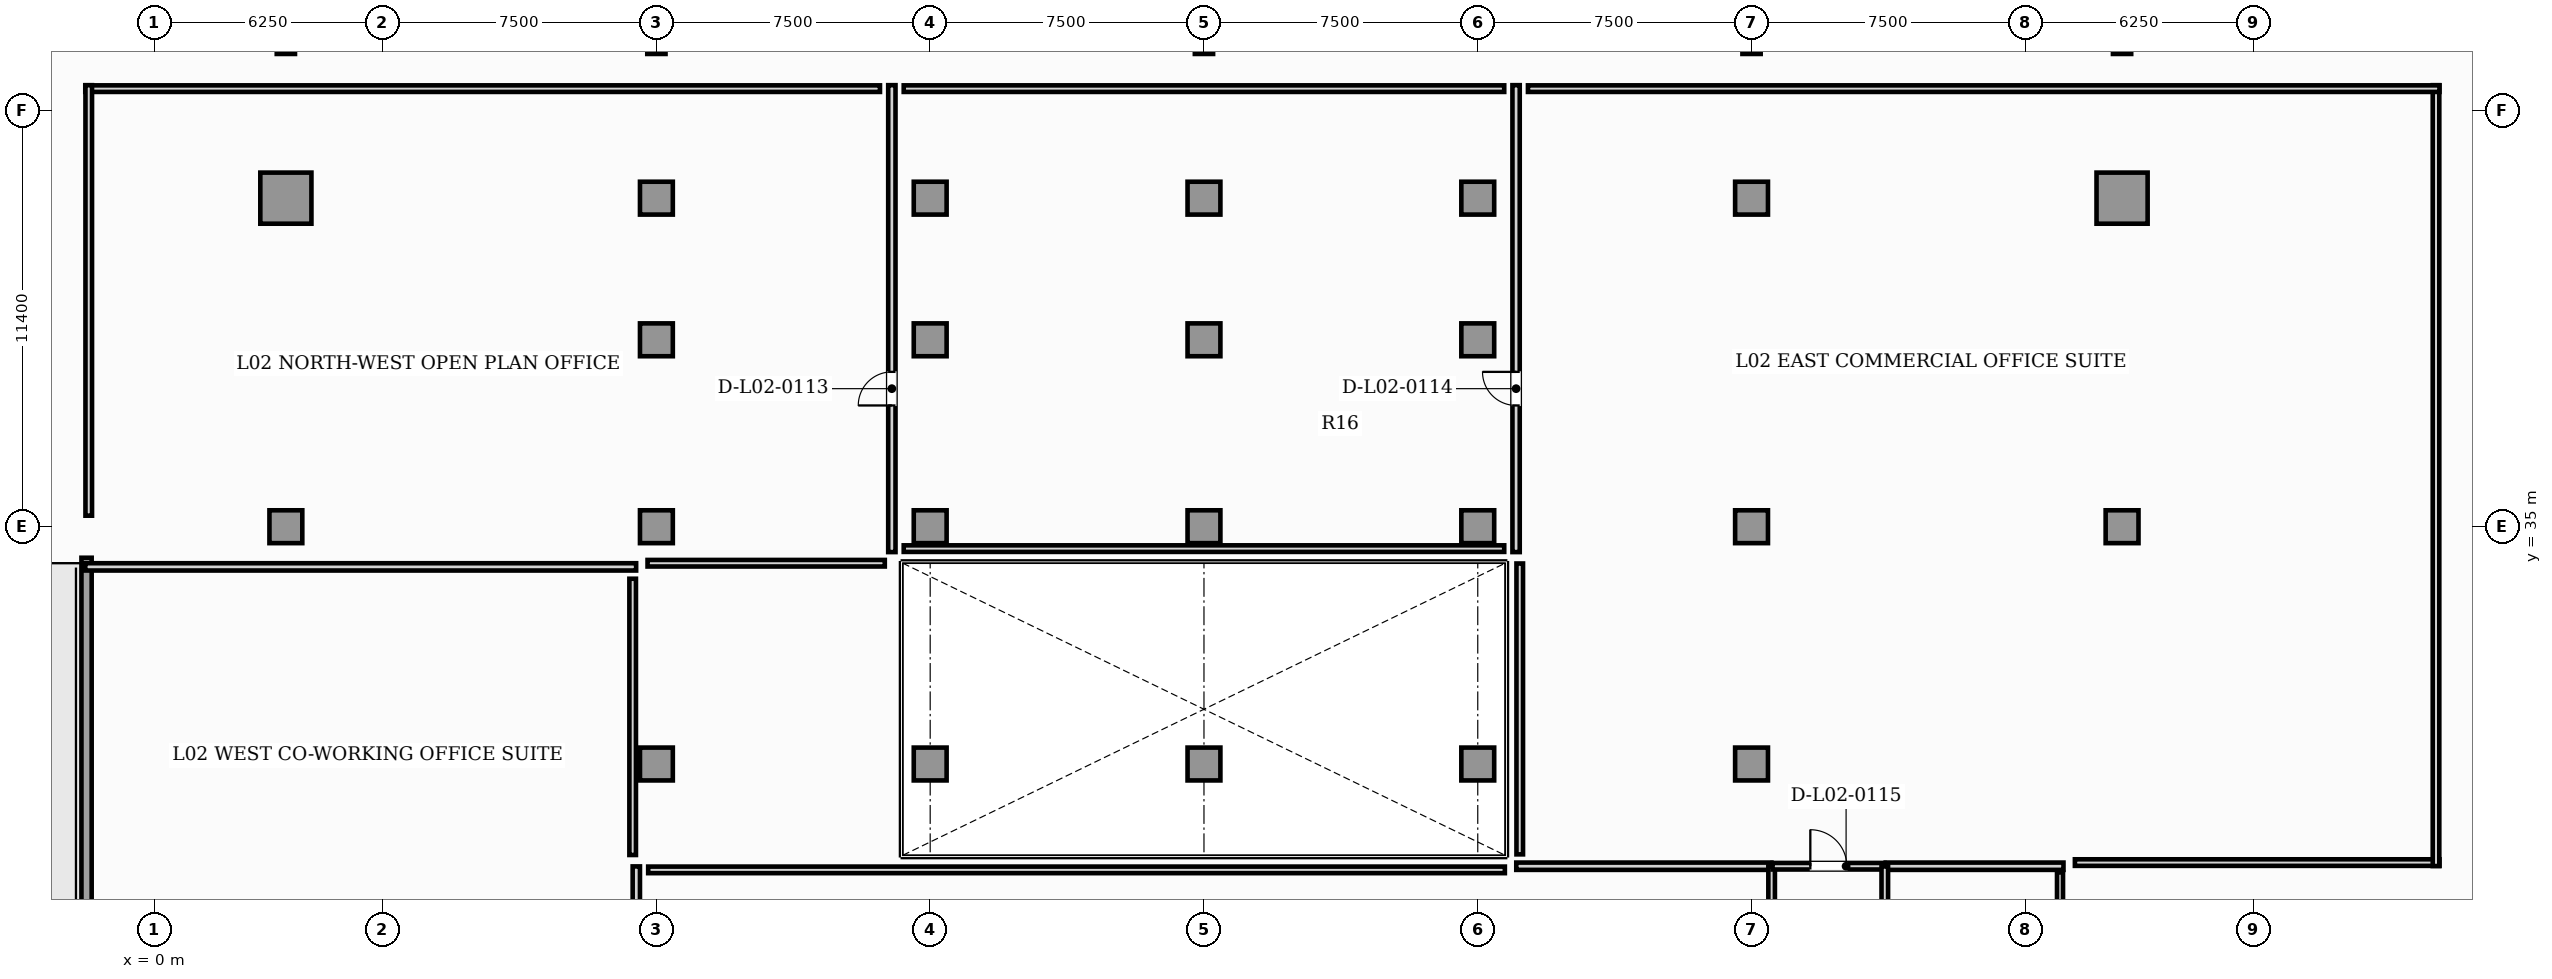
"""IFC4 building model, lengths in metres.
Left out: names, types, materials, properties, quantities, classifications, styles, units other than length and angle.
Written with IfcOpenShell. Run it as: python <this file> out.ifc"""

import sys

from ifc_helpers import new_model, si_unit, direction, frame, frame_2d, origin, origin_2d, place, context, subcontext, project, spatial, rectangle, hollow_rectangle, extrude, element, fill, save


model = new_model("IFC4")
c1 = context("Model", 3, precision=1e-05, world=origin(), true_north=direction((0.0, 1.0)))
c2 = subcontext(c1, "Body", "Model", "MODEL_VIEW")
j1 = project(units=[si_unit("LENGTHUNIT", "METRE"), si_unit("PLANEANGLEUNIT", "RADIAN")], contexts=[c1])
p1 = place(None, origin())
s1 = spatial("IfcSite", under=j1, at=p1, CompositionType="ELEMENT")
p2 = place(p1, origin())
s2 = spatial("IfcBuilding", under=s1, at=p2, CompositionType="ELEMENT")
p3 = place(p2, frame((0.0, 0.0, 10.2)))
s3 = spatial("IfcBuildingStorey", under=s2, at=p3, CompositionType="ELEMENT", Elevation=10.2)
p4 = place(p3, frame((-1.86, 3.88, 0.0), z_axis=(0.0, 0.0, 1.0), x_axis=(0.0, 1.0, 0.0)))
e1 = element("IfcWall", 1, at=p4, inside=s3, PredefinedType="SHEAR", context=c2, shape_type="SweptSolid", body=[
    extrude(rectangle(XDim=30.27, YDim=0.28, at=frame_2d((15.135, 0.0))), origin(), (0.0, 0.0, 1.0), 4.52),
])
for number, where, z_axis, x_axis in (
    (2, (53.9, 44.0, 0.0), (0.0, 0.0, 1.0), (1.0, 0.0, 0.0)),
    (3, (3.6, 44.0, 0.0), (0.0, 0.0, 1.0), (1.0, 0.0, 0.0)),
):
    element("IfcColumn", number, at=place(p3, frame(where, z_axis=z_axis, x_axis=x_axis)), inside=s3, PredefinedType="USERDEFINED", context=c2, shape_type="SweptSolid", body=[
        extrude(hollow_rectangle(XDim=1.4, YDim=1.4, WallThickness=0.08, at=origin_2d()), origin(), (0.0, 0.0, 1.0), 4.8),
    ])
for number, where, z_axis, x_axis in (
    (4, (3.6, 35.0, 0.0), (0.0, 0.0, 1.0), (1.0, 0.0, 0.0)),
    (5, (13.75, 35.0, 0.0), (0.0, 0.0, 1.0), (1.0, 0.0, 0.0)),
    (6, (13.75, 44.0, 0.0), (0.0, 0.0, 1.0), (1.0, 0.0, 0.0)),
    (7, (28.75, 35.0, 0.0), (0.0, 0.0, 1.0), (1.0, 0.0, 0.0)),
    (8, (28.75, 44.0, 0.0), (0.0, 0.0, 1.0), (1.0, 0.0, 0.0)),
    (9, (43.75, 35.0, 0.0), (0.0, 0.0, 1.0), (1.0, 0.0, 0.0)),
    (10, (43.75, 44.0, 0.0), (0.0, 0.0, 1.0), (1.0, 0.0, 0.0)),
    (11, (53.9, 35.0, 0.0), (0.0, 0.0, 1.0), (1.0, 0.0, 0.0)),
    (12, (13.75, 28.5, 0.0), (0.0, 0.0, 1.0), (1.0, 0.0, 0.0)),
    (13, (21.25, 28.5, 0.0), (0.0, 0.0, 1.0), (1.0, 0.0, 0.0)),
    (14, (28.75, 28.5, 0.0), (0.0, 0.0, 1.0), (1.0, 0.0, 0.0)),
    (15, (36.25, 28.5, 0.0), (0.0, 0.0, 1.0), (1.0, 0.0, 0.0)),
    (16, (43.75, 28.5, 0.0), (0.0, 0.0, 1.0), (1.0, 0.0, 0.0)),
    (17, (21.25, 35.0, 0.0), (0.0, 0.0, 1.0), (1.0, 0.0, 0.0)),
    (18, (36.25, 35.0, 0.0), (0.0, 0.0, 1.0), (1.0, 0.0, 0.0)),
    (19, (13.75, 40.12, 0.0), (0.0, 0.0, 1.0), (1.0, 0.0, 0.0)),
    (20, (21.25, 40.12, 0.0), (0.0, 0.0, 1.0), (1.0, 0.0, 0.0)),
    (21, (28.75, 40.12, 0.0), (0.0, 0.0, 1.0), (1.0, 0.0, 0.0)),
    (22, (36.25, 40.12, 0.0), (0.0, 0.0, 1.0), (1.0, 0.0, 0.0)),
    (23, (21.25, 44.0, 0.0), (0.0, 0.0, 1.0), (1.0, 0.0, 0.0)),
    (24, (36.25, 44.0, 0.0), (0.0, 0.0, 1.0), (1.0, 0.0, 0.0)),
):
    element("IfcColumn", number, at=place(p3, frame(where, z_axis=z_axis, x_axis=x_axis)), inside=s3, PredefinedType="COLUMN", context=c2, shape_type="SweptSolid", body=[
        extrude(rectangle(XDim=0.9, YDim=0.9, at=origin_2d()), origin(), (0.0, 0.0, 1.0), 4.8),
    ])
for number, where, z_axis, x_axis in (
    (25, (3.6, 48.2, 0.0), (0.0, 0.0, 1.0), (1.0, 0.0, 0.0)),
    (26, (13.75, 48.2, 0.0), (0.0, 0.0, 1.0), (1.0, 0.0, 0.0)),
    (27, (28.75, 48.2, 0.0), (0.0, 0.0, 1.0), (1.0, 0.0, 0.0)),
    (28, (43.75, 48.2, 0.0), (0.0, 0.0, 1.0), (1.0, 0.0, 0.0)),
    (29, (53.9, 48.2, 0.0), (0.0, 0.0, 1.0), (1.0, 0.0, 0.0)),
):
    element("IfcColumn", number, at=place(p3, frame(where, z_axis=z_axis, x_axis=x_axis)), inside=s3, PredefinedType="COLUMN", context=c2, shape_type="SweptSolid", body=[
        extrude(hollow_rectangle(XDim=0.5, YDim=0.5, WallThickness=0.032, at=origin_2d()), origin(), (0.0, 0.0, 1.0), 4.8),
    ])
p5 = place(p3, frame((13.2, 14.155, 0.0), z_axis=(0.0, 0.0, 1.0), x_axis=(0.0, 1.0, 0.0)))
e30 = element("IfcWall", 30, at=p5, inside=s3, PredefinedType="PARTITIONING", context=c2, shape_type="SweptSolid", body=[
    extrude(rectangle(XDim=11.54, YDim=0.2, at=frame_2d((5.77, 0.0))), origin(), (0.0, 0.0, 1.0), 4.52),
])
p6 = place(p3, frame((37.305, 25.7, 0.0), z_axis=(0.0, 0.0, 1.0), x_axis=(1.0, 0.0, 0.0)))
e31 = element("IfcWall", 31, at=p6, inside=s3, PredefinedType="PARTITIONING", context=c2, shape_type="SweptSolid", body=[
    extrude(rectangle(XDim=6.99, YDim=0.2, at=frame_2d((3.495, 0.0))), origin(), (0.0, 0.0, 1.0), 4.52),
])
p7 = place(p3, frame((44.3, 14.155, 0.0), z_axis=(0.0, 0.0, 1.0), x_axis=(0.0, 1.0, 0.0)))
e32 = element("IfcWall", 32, at=p7, inside=s3, PredefinedType="PARTITIONING", context=c2, shape_type="SweptSolid", body=[
    extrude(rectangle(XDim=11.54, YDim=0.18, at=frame_2d((5.77, 0.0))), origin(), (0.0, 0.0, 1.0), 4.52),
])
p8 = place(p7, frame((5.27, 0.0, 0.0)))
e33 = element("IfcOpeningElement", 33, at=p8, cuts=e32, PredefinedType="OPENING", context=c2, shape_type="SweptSolid", body=[
    extrude(rectangle(XDim=1.0, YDim=2.15, at=frame_2d((0.5, 1.075))), frame((0.0, 0.1, 0.0), z_axis=(0.0, -1.0, 0.0), x_axis=(1.0, 0.0, 0.0)), (0.0, 0.0, 1.0), 0.2),
])
p9 = place(p3, frame((-1.895, 33.9, 0.0), z_axis=(0.0, 0.0, 1.0), x_axis=(1.0, 0.0, 0.0)))
e34 = element("IfcWall", 34, at=p9, inside=s3, PredefinedType="PARTITIONING", context=c2, shape_type="SweptSolid", body=[
    extrude(rectangle(XDim=15.09, YDim=0.2, at=frame_2d((7.545, 0.0))), origin(), (0.0, 0.0, 1.0), 4.52),
])
p10 = place(p3, frame((20.2, 34.305, 0.0), z_axis=(0.0, 0.0, 1.0), x_axis=(0.0, 1.0, 0.0)))
e35 = element("IfcWall", 35, at=p10, inside=s3, PredefinedType="PARTITIONING", context=c2, shape_type="SweptSolid", body=[
    extrude(rectangle(XDim=12.79, YDim=0.2, at=frame_2d((6.395, 0.0))), origin(), (0.0, 0.0, 1.0), 4.52),
])
p11 = place(p10, frame((4.017, 0.0, 0.0)))
e36 = element("IfcOpeningElement", 36, at=p11, cuts=e35, PredefinedType="OPENING", context=c2, shape_type="SweptSolid", body=[
    extrude(rectangle(XDim=0.92, YDim=2.1, at=frame_2d((0.46, 1.05))), frame((0.0, 0.11, 0.0), z_axis=(0.0, -1.0, 0.0), x_axis=(1.0, 0.0, 0.0)), (0.0, 0.0, 1.0), 0.22),
])
p12 = place(p3, frame((37.3, 34.305, 0.0), z_axis=(0.0, 0.0, 1.0), x_axis=(0.0, 1.0, 0.0)))
e37 = element("IfcWall", 37, at=p12, inside=s3, PredefinedType="PARTITIONING", context=c2, shape_type="SweptSolid", body=[
    extrude(rectangle(XDim=12.79, YDim=0.2, at=frame_2d((6.395, 0.0))), origin(), (0.0, 0.0, 1.0), 4.52),
])
p13 = place(p12, frame((4.017, 0.0, 0.0)))
e38 = element("IfcOpeningElement", 38, at=p13, cuts=e37, PredefinedType="OPENING", context=c2, shape_type="SweptSolid", body=[
    extrude(rectangle(XDim=0.92, YDim=2.1, at=frame_2d((0.46, 1.05))), frame((0.0, 0.11, 0.0), z_axis=(0.0, -1.0, 0.0), x_axis=(1.0, 0.0, 0.0)), (0.0, 0.0, 1.0), 0.22),
])
p14 = place(p3, frame((44.325, 25.7, 0.0), z_axis=(0.0, 0.0, 1.0), x_axis=(1.0, 0.0, 0.0)))
e39 = element("IfcWall", 39, at=p14, inside=s3, PredefinedType="PARTITIONING", context=c2, shape_type="SweptSolid", body=[
    extrude(rectangle(XDim=3.07, YDim=0.18, at=frame_2d((1.535, 0.0))), origin(), (0.0, 0.0, 1.0), 4.52),
])
p15 = place(p14, frame((1.035, 0.0, 0.0)))
e40 = element("IfcOpeningElement", 40, at=p15, cuts=e39, PredefinedType="OPENING", context=c2, shape_type="SweptSolid", body=[
    extrude(rectangle(XDim=1.0, YDim=2.15, at=frame_2d((0.5, 1.075))), frame((0.0, 0.1, 0.0), z_axis=(0.0, -1.0, 0.0), x_axis=(1.0, 0.0, 0.0)), (0.0, 0.0, 1.0), 0.2),
])
p16 = place(p3, frame((47.425, 25.7, 0.0), z_axis=(0.0, 0.0, 1.0), x_axis=(1.0, 0.0, 0.0)))
e41 = element("IfcWall", 41, at=p16, inside=s3, PredefinedType="PARTITIONING", context=c2, shape_type="SweptSolid", body=[
    extrude(rectangle(XDim=4.87, YDim=0.2, at=frame_2d((2.435, 0.0))), origin(), (0.0, 0.0, 1.0), 4.52),
])
p17 = place(p3, frame((47.4, 21.775, 0.0), z_axis=(0.0, 0.0, 1.0), x_axis=(0.0, 1.0, 0.0)))
e42 = element("IfcWall", 42, at=p17, inside=s3, PredefinedType="PARTITIONING", context=c2, shape_type="SweptSolid", body=[
    extrude(rectangle(XDim=3.92, YDim=0.18, at=frame_2d((1.96, 0.0))), origin(), (0.0, 0.0, 1.0), 4.52),
])
p18 = place(p17, frame((1.435, 0.0, 0.0)))
e43 = element("IfcOpeningElement", 43, at=p18, cuts=e42, PredefinedType="OPENING", context=c2, shape_type="SweptSolid", body=[
    extrude(rectangle(XDim=1.05, YDim=2.15, at=frame_2d((0.525, 1.075))), frame((0.0, 0.1, 0.0), z_axis=(0.0, -1.0, 0.0), x_axis=(1.0, 0.0, 0.0)), (0.0, 0.0, 1.0), 0.2),
])
p19 = place(p3, frame((36.993, 25.6, 0.0), z_axis=(0.0, 0.0, 1.0), x_axis=(-1.0, 0.0, 0.0)))
e44 = element("IfcWall", 44, at=p19, inside=s3, PredefinedType="PARTITIONING", context=c2, shape_type="SweptSolid", body=[
    extrude(rectangle(XDim=23.468, YDim=0.18, at=frame_2d((11.734, 0.0))), origin(), (0.0, 0.0, 1.0), 4.52),
])
p20 = place(p3, frame((13.1, 26.007, 0.0), z_axis=(0.0, 0.0, 1.0), x_axis=(0.0, 1.0, 0.0)))
e45 = element("IfcWall", 45, at=p20, inside=s3, PredefinedType="PARTITIONING", context=c2, shape_type="SweptSolid", body=[
    extrude(rectangle(XDim=7.568, YDim=0.18, at=frame_2d((3.784, 0.0))), origin(), (0.0, 0.0, 1.0), 4.52),
])
p21 = place(p3, frame((13.507, 34.0, 0.0), z_axis=(0.0, 0.0, 1.0), x_axis=(1.0, 0.0, 0.0)))
e46 = element("IfcWall", 46, at=p21, inside=s3, PredefinedType="PARTITIONING", context=c2, shape_type="SweptSolid", body=[
    extrude(rectangle(XDim=6.5, YDim=0.18, at=frame_2d((3.25, 0.0))), origin(), (0.0, 0.0, 1.0), 4.52),
])
p22 = place(p3, frame((19.875, 47.0, 0.0), z_axis=(0.0, 0.0, 1.0), x_axis=(-1.0, 0.0, 0.0)))
e47 = element("IfcWall", 47, at=p22, inside=s3, PredefinedType="PARTITIONING", context=c2, shape_type="SweptSolid", body=[
    extrude(rectangle(XDim=21.77, YDim=0.18, at=frame_2d((10.885, 0.0))), origin(), (0.0, 0.0, 1.0), 4.52),
])
p23 = place(p3, frame((-1.8, 47.095, 0.0), z_axis=(0.0, 0.0, 1.0), x_axis=(0.0, -1.0, 0.0)))
e48 = element("IfcWall", 48, at=p23, inside=s3, PredefinedType="PARTITIONING", context=c2, shape_type="SweptSolid", body=[
    extrude(rectangle(XDim=11.793, YDim=0.18, at=frame_2d((5.896, 0.0))), origin(), (0.0, 0.0, 1.0), 4.52),
])
for number, where, z_axis, x_axis in (
    (49, (20.525, 34.4, 0.0), (0.0, 0.0, 1.0), (1.0, 0.0, 0.0)),
    (50, (36.975, 47.0, 0.0), (0.0, 0.0, 1.0), (-1.0, 0.0, 0.0)),
):
    element("IfcWall", number, at=place(p3, frame(where, z_axis=z_axis, x_axis=x_axis)), inside=s3, PredefinedType="PARTITIONING", context=c2, shape_type="SweptSolid", body=[
        extrude(rectangle(XDim=16.45, YDim=0.18, at=frame_2d((8.225, 0.0))), origin(), (0.0, 0.0, 1.0), 4.52),
    ])
p24 = place(p3, frame((52.607, 25.8, 0.0), z_axis=(0.0, 0.0, 1.0), x_axis=(1.0, 0.0, 0.0)))
e51 = element("IfcWall", 51, at=p24, inside=s3, PredefinedType="PARTITIONING", context=c2, shape_type="SweptSolid", body=[
    extrude(rectangle(XDim=9.988, YDim=0.18, at=frame_2d((4.994, 0.0))), origin(), (0.0, 0.0, 1.0), 4.52),
])
p25 = place(p3, frame((62.5, 25.705, 0.0), z_axis=(0.0, 0.0, 1.0), x_axis=(0.0, 1.0, 0.0)))
e52 = element("IfcWall", 52, at=p25, inside=s3, PredefinedType="PARTITIONING", context=c2, shape_type="SweptSolid", body=[
    extrude(rectangle(XDim=21.39, YDim=0.18, at=frame_2d((10.695, 0.0))), origin(), (0.0, 0.0, 1.0), 4.52),
])
p26 = place(p3, frame((62.595, 47.0, 0.0), z_axis=(0.0, 0.0, 1.0), x_axis=(-1.0, 0.0, 0.0)))
e53 = element("IfcWall", 53, at=p26, inside=s3, PredefinedType="PARTITIONING", context=c2, shape_type="SweptSolid", body=[
    extrude(rectangle(XDim=24.97, YDim=0.18, at=frame_2d((12.485, 0.0))), origin(), (0.0, 0.0, 1.0), 4.52),
])
p27 = place(p3, frame((37.4, 33.993, 0.0), z_axis=(0.0, 0.0, 1.0), x_axis=(0.0, -1.0, 0.0)))
e54 = element("IfcWall", 54, at=p27, inside=s3, PredefinedType="PARTITIONING", context=c2, shape_type="SweptSolid", body=[
    extrude(rectangle(XDim=7.968, YDim=0.18, at=frame_2d((3.984, 0.0))), origin(), (0.0, 0.0, 1.0), 4.52),
])
p28 = place(p3, frame((52.2, 21.905, 0.0), z_axis=(0.0, 0.0, 1.0), x_axis=(0.0, 1.0, 0.0)))
e55 = element("IfcWall", 55, at=p28, inside=s3, PredefinedType="PLUMBINGWALL", context=c2, shape_type="SweptSolid", body=[
    extrude(rectangle(XDim=3.63, YDim=0.165, at=frame_2d((1.815, 0.0))), origin(), (0.0, 0.0, 1.0), 4.52),
])
p29 = place(p11, origin())
e56 = element("IfcDoor", 56, at=p29, inside=s3, OperationType="SINGLE_SWING_LEFT", PredefinedType="DOOR", context=c2, shape_type="SweptSolid", body=[
    extrude(rectangle(XDim=0.92, YDim=2.1, at=frame_2d((0.46, 1.05))), frame((0.0, 0.025, 0.0), z_axis=(0.0, -1.0, 0.0), x_axis=(1.0, 0.0, 0.0)), (0.0, 0.0, 1.0), 0.05),
])
fill(e36, e56)
p30 = place(p13, origin())
e57 = element("IfcDoor", 57, at=p30, inside=s3, OperationType="SINGLE_SWING_RIGHT", PredefinedType="DOOR", context=c2, shape_type="SweptSolid", body=[
    extrude(rectangle(XDim=0.92, YDim=2.1, at=frame_2d((0.46, 1.05))), frame((0.0, 0.025, 0.0), z_axis=(0.0, -1.0, 0.0), x_axis=(1.0, 0.0, 0.0)), (0.0, 0.0, 1.0), 0.05),
])
fill(e38, e57)
p31 = place(p15, origin())
e58 = element("IfcDoor", 58, at=p31, inside=s3, OperationType="SINGLE_SWING_LEFT", PredefinedType="DOOR", context=c2, shape_type="SweptSolid", body=[
    extrude(rectangle(XDim=1.0, YDim=2.15, at=frame_2d((0.5, 1.075))), frame((0.0, 0.025, 0.0), z_axis=(0.0, -1.0, 0.0), x_axis=(1.0, 0.0, 0.0)), (0.0, 0.0, 1.0), 0.05),
])
fill(e40, e58)
save(model, sys.argv[1])
